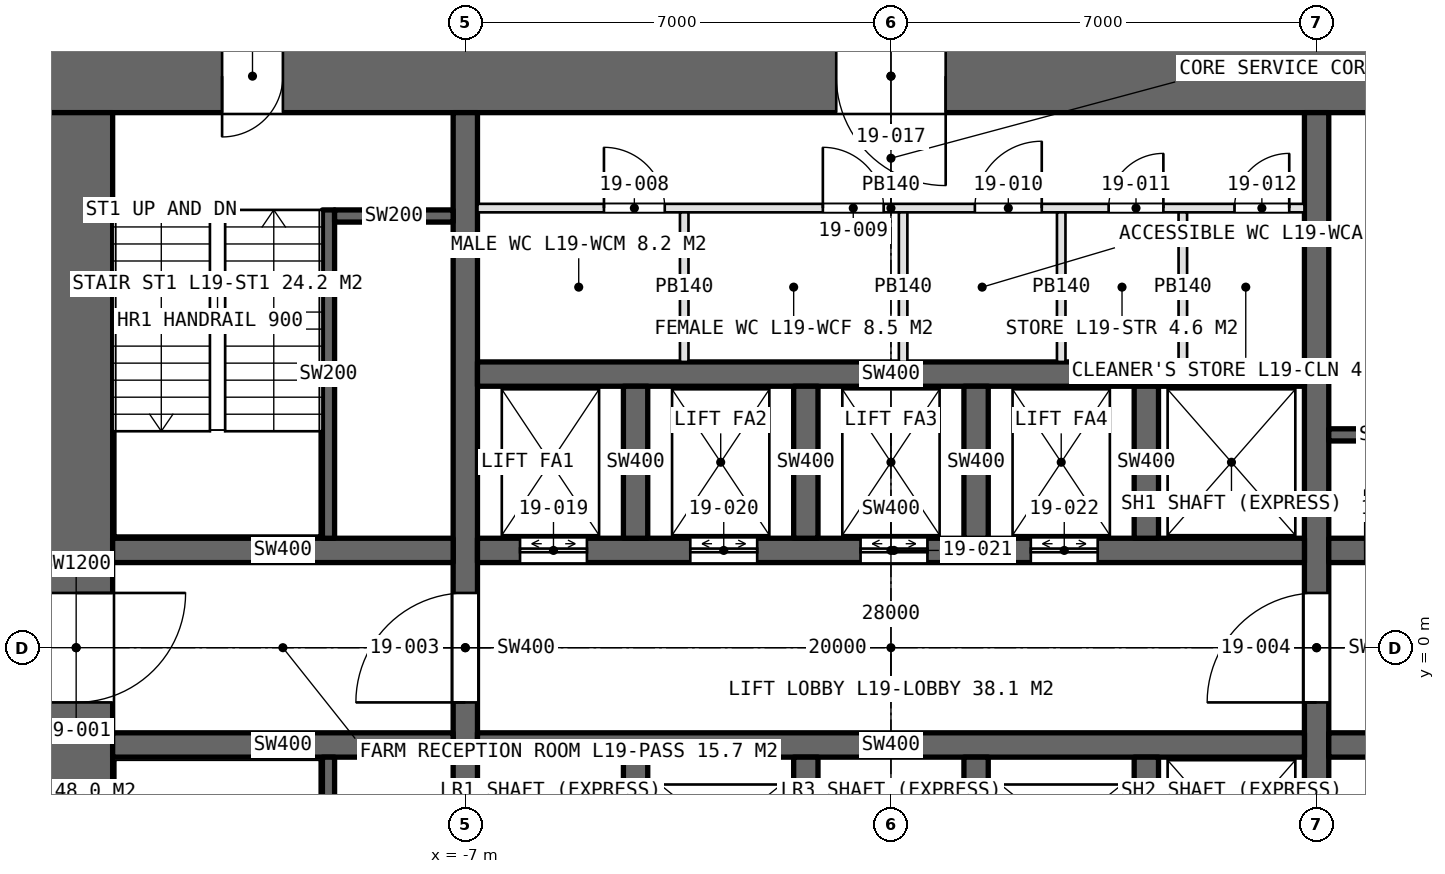
"""IFC4 building model, lengths in metres.
Left out: names, types, materials, properties, quantities, classifications, styles, units other than length and angle.
Written with IfcOpenShell. Run it as: python <this file> out.ifc"""

import sys

from ifc_helpers import new_model, si_unit, direction, frame, frame_2d, origin, place, context, subcontext, project, spatial, rectangle, extrude, element, fill, save


model = new_model("IFC4")
c1 = context("Model", 3, precision=1e-05, world=origin(), true_north=direction((0.0, 1.0)))
c2 = subcontext(c1, "Body", "Model", "MODEL_VIEW")
j1 = project(units=[si_unit("LENGTHUNIT", "METRE"), si_unit("PLANEANGLEUNIT", "RADIAN")], contexts=[c1])
p1 = place(None, origin())
s1 = spatial("IfcSite", under=j1, at=p1, CompositionType="ELEMENT")
p2 = place(p1, origin())
s2 = spatial("IfcBuilding", under=s1, at=p2, CompositionType="ELEMENT")
p3 = place(p2, frame((0.0, 0.0, 95.0)))
s3 = spatial("IfcBuildingStorey", under=s2, at=p3, CompositionType="ELEMENT", Elevation=95.0)
p4 = place(p3, frame((14.0, 9.4, 0.0), z_axis=(0.0, 0.0, 1.0), x_axis=(-1.0, 0.0, 0.0)))
e1 = element("IfcWall", 1, at=p4, inside=s3, PredefinedType="SHEAR", context=c2, shape_type="SweptSolid", body=[
    extrude(rectangle(XDim=28.0, YDim=1.2, at=frame_2d((14.0, 0.0))), origin(), (0.0, 0.0, 1.0), 5.0),
])
p5 = place(p4, frame((24.0, 0.0, 0.0)))
e2 = element("IfcOpeningElement", 2, at=p5, cuts=e1, PredefinedType="OPENING", context=c2, shape_type="SweptSolid", body=[
    extrude(rectangle(XDim=1.0, YDim=2.4, at=frame_2d((0.5, 1.2))), frame((0.0, 0.61, 0.0), z_axis=(0.0, -1.0, 0.0), x_axis=(1.0, 0.0, 0.0)), (0.0, 0.0, 1.0), 1.22),
])
p6 = place(p4, frame((13.1, 0.0, 0.0)))
e3 = element("IfcOpeningElement", 3, at=p6, cuts=e1, PredefinedType="OPENING", context=c2, shape_type="SweptSolid", body=[
    extrude(rectangle(XDim=1.8, YDim=2.4, at=frame_2d((0.9, 1.2))), frame((0.0, 0.61, 0.0), z_axis=(0.0, -1.0, 0.0), x_axis=(1.0, 0.0, 0.0)), (0.0, 0.0, 1.0), 1.22),
])
p7 = place(p3, frame((-13.4, 8.8, 0.0), z_axis=(0.0, 0.0, 1.0), x_axis=(0.0, -1.0, 0.0)))
e4 = element("IfcWall", 4, at=p7, inside=s3, PredefinedType="SHEAR", context=c2, shape_type="SweptSolid", body=[
    extrude(rectangle(XDim=17.6, YDim=1.2, at=frame_2d((8.8, 0.0))), origin(), (0.0, 0.0, 1.0), 5.0),
])
p8 = place(p7, frame((7.9, 0.0, 0.0)))
e5 = element("IfcOpeningElement", 5, at=p8, cuts=e4, PredefinedType="OPENING", context=c2, shape_type="SweptSolid", body=[
    extrude(rectangle(XDim=1.8, YDim=2.4, at=frame_2d((0.9, 1.2))), frame((0.0, 0.61, 0.0), z_axis=(0.0, -1.0, 0.0), x_axis=(1.0, 0.0, 0.0)), (0.0, 0.0, 1.0), 1.22),
])
p9 = place(p7, frame((16.5, 0.0, 0.0)))
e6 = element("IfcOpeningElement", 6, at=p9, cuts=e4, PredefinedType="OPENING", context=c2, shape_type="SweptSolid", body=[
    extrude(rectangle(XDim=1.0, YDim=2.4, at=frame_2d((0.5, 1.2))), frame((0.0, 0.61, 0.0), z_axis=(0.0, -1.0, 0.0), x_axis=(1.0, 0.0, 0.0)), (0.0, 0.0, 1.0), 1.22),
])
p10 = place(p3, frame((-7.0, -8.8, 0.0), z_axis=(0.0, 0.0, 1.0), x_axis=(0.0, 1.0, 0.0)))
e7 = element("IfcWall", 7, at=p10, inside=s3, PredefinedType="SHEAR", context=c2, shape_type="SweptSolid", body=[
    extrude(rectangle(XDim=17.6, YDim=0.4, at=frame_2d((8.8, 0.0))), origin(), (0.0, 0.0, 1.0), 5.0),
])
p11 = place(p10, frame((7.9, 0.0, 0.0)))
e8 = element("IfcOpeningElement", 8, at=p11, cuts=e7, PredefinedType="OPENING", context=c2, shape_type="SweptSolid", body=[
    extrude(rectangle(XDim=1.8, YDim=2.4, at=frame_2d((0.9, 1.2))), frame((0.0, 0.21, 0.0), z_axis=(0.0, -1.0, 0.0), x_axis=(1.0, 0.0, 0.0)), (0.0, 0.0, 1.0), 0.42),
])
p12 = place(p3, frame((7.0, -8.8, 0.0), z_axis=(0.0, 0.0, 1.0), x_axis=(0.0, 1.0, 0.0)))
e9 = element("IfcWall", 9, at=p12, inside=s3, PredefinedType="SHEAR", context=c2, shape_type="SweptSolid", body=[
    extrude(rectangle(XDim=17.6, YDim=0.4, at=frame_2d((8.8, 0.0))), origin(), (0.0, 0.0, 1.0), 5.0),
])
p13 = place(p12, frame((7.9, 0.0, 0.0)))
e10 = element("IfcOpeningElement", 10, at=p13, cuts=e9, PredefinedType="OPENING", context=c2, shape_type="SweptSolid", body=[
    extrude(rectangle(XDim=1.8, YDim=2.4, at=frame_2d((0.9, 1.2))), frame((0.0, 0.21, 0.0), z_axis=(0.0, -1.0, 0.0), x_axis=(1.0, 0.0, 0.0)), (0.0, 0.0, 1.0), 0.42),
])
p14 = place(p3, frame((-6.8, 1.6, 0.0), z_axis=(0.0, 0.0, 1.0), x_axis=(1.0, 0.0, 0.0)))
e11 = element("IfcWall", 11, at=p14, inside=s3, PredefinedType="SHEAR", context=c2, shape_type="SweptSolid", body=[
    extrude(rectangle(XDim=13.6, YDim=0.4, at=frame_2d((6.8, 0.0))), origin(), (0.0, 0.0, 1.0), 5.0),
])
p15 = place(p14, frame((0.7, 0.0, 0.0)))
e12 = element("IfcOpeningElement", 12, at=p15, cuts=e11, PredefinedType="OPENING", context=c2, shape_type="SweptSolid", body=[
    extrude(rectangle(XDim=1.1, YDim=2.4, at=frame_2d((0.55, 1.2))), frame((0.0, 0.21, 0.0), z_axis=(0.0, -1.0, 0.0), x_axis=(1.0, 0.0, 0.0)), (0.0, 0.0, 1.0), 0.42),
])
p16 = place(p14, frame((3.5, 0.0, 0.0)))
e13 = element("IfcOpeningElement", 13, at=p16, cuts=e11, PredefinedType="OPENING", context=c2, shape_type="SweptSolid", body=[
    extrude(rectangle(XDim=1.1, YDim=2.4, at=frame_2d((0.55, 1.2))), frame((0.0, 0.21, 0.0), z_axis=(0.0, -1.0, 0.0), x_axis=(1.0, 0.0, 0.0)), (0.0, 0.0, 1.0), 0.42),
])
p17 = place(p14, frame((6.3, 0.0, 0.0)))
e14 = element("IfcOpeningElement", 14, at=p17, cuts=e11, PredefinedType="OPENING", context=c2, shape_type="SweptSolid", body=[
    extrude(rectangle(XDim=1.1, YDim=2.4, at=frame_2d((0.55, 1.2))), frame((0.0, 0.21, 0.0), z_axis=(0.0, -1.0, 0.0), x_axis=(1.0, 0.0, 0.0)), (0.0, 0.0, 1.0), 0.42),
])
p18 = place(p14, frame((9.1, 0.0, 0.0)))
e15 = element("IfcOpeningElement", 15, at=p18, cuts=e11, PredefinedType="OPENING", context=c2, shape_type="SweptSolid", body=[
    extrude(rectangle(XDim=1.1, YDim=2.4, at=frame_2d((0.55, 1.2))), frame((0.0, 0.21, 0.0), z_axis=(0.0, -1.0, 0.0), x_axis=(1.0, 0.0, 0.0)), (0.0, 0.0, 1.0), 0.42),
])
for number, where, z_axis, x_axis in (
    (16, (-6.8, -1.6, 0.0), (0.0, 0.0, 1.0), (1.0, 0.0, 0.0)),
    (17, (-6.8, 4.5, 0.0), (0.0, 0.0, 1.0), (1.0, 0.0, 0.0)),
):
    element("IfcWall", number, at=place(p3, frame(where, z_axis=z_axis, x_axis=x_axis)), inside=s3, PredefinedType="SHEAR", context=c2, shape_type="SweptSolid", body=[
        extrude(rectangle(XDim=13.6, YDim=0.4, at=frame_2d((6.8, 0.0))), origin(), (0.0, 0.0, 1.0), 5.0),
    ])
for number, where, z_axis, x_axis in (
    (18, (-12.8, 1.6, 0.0), (0.0, 0.0, 1.0), (1.0, 0.0, 0.0)),
    (19, (-12.8, -1.6, 0.0), (0.0, 0.0, 1.0), (1.0, 0.0, 0.0)),
):
    element("IfcWall", number, at=place(p3, frame(where, z_axis=z_axis, x_axis=x_axis)), inside=s3, PredefinedType="SHEAR", context=c2, shape_type="SweptSolid", body=[
        extrude(rectangle(XDim=5.6, YDim=0.4, at=frame_2d((2.8, 0.0))), origin(), (0.0, 0.0, 1.0), 5.0),
    ])
p19 = place(p3, frame((7.2, 1.6, 0.0), z_axis=(0.0, 0.0, 1.0), x_axis=(1.0, 0.0, 0.0)))
e20 = element("IfcWall", 20, at=p19, inside=s3, PredefinedType="SHEAR", context=c2, shape_type="SweptSolid", body=[
    extrude(rectangle(XDim=5.6, YDim=0.4, at=frame_2d((2.8, 0.0))), origin(), (0.0, 0.0, 1.0), 5.0),
])
p20 = place(p19, frame((0.6, 0.0, 0.0)))
e21 = element("IfcOpeningElement", 21, at=p20, cuts=e20, PredefinedType="OPENING", context=c2, shape_type="SweptSolid", body=[
    extrude(rectangle(XDim=1.0, YDim=2.4, at=frame_2d((0.5, 1.2))), frame((0.0, 0.21, 0.0), z_axis=(0.0, -1.0, 0.0), x_axis=(1.0, 0.0, 0.0)), (0.0, 0.0, 1.0), 0.42),
])
p21 = place(p3, frame((7.2, -1.6, 0.0), z_axis=(0.0, 0.0, 1.0), x_axis=(1.0, 0.0, 0.0)))
e22 = element("IfcWall", 22, at=p21, inside=s3, PredefinedType="SHEAR", context=c2, shape_type="SweptSolid", body=[
    extrude(rectangle(XDim=5.6, YDim=0.4, at=frame_2d((2.8, 0.0))), origin(), (0.0, 0.0, 1.0), 5.0),
])
p22 = place(p21, frame((0.9, 0.0, 0.0)))
e23 = element("IfcOpeningElement", 23, at=p22, cuts=e22, PredefinedType="OPENING", context=c2, shape_type="SweptSolid", body=[
    extrude(rectangle(XDim=1.3, YDim=2.4, at=frame_2d((0.65, 1.2))), frame((0.0, 0.21, 0.0), z_axis=(0.0, -1.0, 0.0), x_axis=(1.0, 0.0, 0.0)), (0.0, 0.0, 1.0), 0.42),
])
p23 = place(p21, frame((3.9, 0.0, 0.0)))
e24 = element("IfcOpeningElement", 24, at=p23, cuts=e22, PredefinedType="OPENING", context=c2, shape_type="SweptSolid", body=[
    extrude(rectangle(XDim=1.3, YDim=2.4, at=frame_2d((0.65, 1.2))), frame((0.0, 0.21, 0.0), z_axis=(0.0, -1.0, 0.0), x_axis=(1.0, 0.0, 0.0)), (0.0, 0.0, 1.0), 0.42),
])
for number, where, z_axis, x_axis in (
    (25, (-4.2, 1.8, 0.0), (0.0, 0.0, 1.0), (0.0, 1.0, 0.0)),
    (26, (-4.2, -4.3, 0.0), (0.0, 0.0, 1.0), (0.0, 1.0, 0.0)),
    (27, (-1.4, 1.8, 0.0), (0.0, 0.0, 1.0), (0.0, 1.0, 0.0)),
    (28, (-1.4, -4.3, 0.0), (0.0, 0.0, 1.0), (0.0, 1.0, 0.0)),
    (29, (1.4, 1.8, 0.0), (0.0, 0.0, 1.0), (0.0, 1.0, 0.0)),
    (30, (1.4, -4.3, 0.0), (0.0, 0.0, 1.0), (0.0, 1.0, 0.0)),
    (31, (4.2, 1.8, 0.0), (0.0, 0.0, 1.0), (0.0, 1.0, 0.0)),
    (32, (4.2, -4.3, 0.0), (0.0, 0.0, 1.0), (0.0, 1.0, 0.0)),
):
    element("IfcWall", number, at=place(p3, frame(where, z_axis=z_axis, x_axis=x_axis)), inside=s3, PredefinedType="SHEAR", context=c2, shape_type="SweptSolid", body=[
        extrude(rectangle(XDim=2.5, YDim=0.4, at=frame_2d((1.25, 0.0))), origin(), (0.0, 0.0, 1.0), 5.0),
    ])
p24 = place(p3, frame((-6.8, 7.23, 0.0), z_axis=(0.0, 0.0, 1.0), x_axis=(1.0, 0.0, 0.0)))
e33 = element("IfcWall", 33, at=p24, inside=s3, PredefinedType="PARTITIONING", context=c2, shape_type="SweptSolid", body=[
    extrude(rectangle(XDim=13.6, YDim=0.14, at=frame_2d((6.8, 0.0))), origin(), (0.0, 0.0, 1.0), 4.75),
])
p25 = place(p24, frame((2.08, 0.0, 0.0)))
e34 = element("IfcOpeningElement", 34, at=p25, cuts=e33, PredefinedType="OPENING", context=c2, shape_type="SweptSolid", body=[
    extrude(rectangle(XDim=1.0, YDim=2.4, at=frame_2d((0.5, 1.2))), frame((0.0, 0.08, 0.0), z_axis=(0.0, -1.0, 0.0), x_axis=(1.0, 0.0, 0.0)), (0.0, 0.0, 1.0), 0.16),
])
p26 = place(p24, frame((5.68, 0.0, 0.0)))
e35 = element("IfcOpeningElement", 35, at=p26, cuts=e33, PredefinedType="OPENING", context=c2, shape_type="SweptSolid", body=[
    extrude(rectangle(XDim=1.0, YDim=2.4, at=frame_2d((0.5, 1.2))), frame((0.0, 0.08, 0.0), z_axis=(0.0, -1.0, 0.0), x_axis=(1.0, 0.0, 0.0)), (0.0, 0.0, 1.0), 0.16),
])
p27 = place(p24, frame((8.18, 0.0, 0.0)))
e36 = element("IfcOpeningElement", 36, at=p27, cuts=e33, PredefinedType="OPENING", context=c2, shape_type="SweptSolid", body=[
    extrude(rectangle(XDim=1.1, YDim=2.4, at=frame_2d((0.55, 1.2))), frame((0.0, 0.08, 0.0), z_axis=(0.0, -1.0, 0.0), x_axis=(1.0, 0.0, 0.0)), (0.0, 0.0, 1.0), 0.16),
])
p28 = place(p24, frame((10.38, 0.0, 0.0)))
e37 = element("IfcOpeningElement", 37, at=p28, cuts=e33, PredefinedType="OPENING", context=c2, shape_type="SweptSolid", body=[
    extrude(rectangle(XDim=0.9, YDim=2.4, at=frame_2d((0.45, 1.2))), frame((0.0, 0.08, 0.0), z_axis=(0.0, -1.0, 0.0), x_axis=(1.0, 0.0, 0.0)), (0.0, 0.0, 1.0), 0.16),
])
p29 = place(p24, frame((12.45, 0.0, 0.0)))
e38 = element("IfcOpeningElement", 38, at=p29, cuts=e33, PredefinedType="OPENING", context=c2, shape_type="SweptSolid", body=[
    extrude(rectangle(XDim=0.9, YDim=2.4, at=frame_2d((0.45, 1.2))), frame((0.0, 0.08, 0.0), z_axis=(0.0, -1.0, 0.0), x_axis=(1.0, 0.0, 0.0)), (0.0, 0.0, 1.0), 0.16),
])
for number, where, z_axis, x_axis in (
    (39, (-3.4, 4.7, 0.0), (0.0, 0.0, 1.0), (0.0, 1.0, 0.0)),
    (40, (0.2, 4.7, 0.0), (0.0, 0.0, 1.0), (0.0, 1.0, 0.0)),
    (41, (2.8, 4.7, 0.0), (0.0, 0.0, 1.0), (0.0, 1.0, 0.0)),
    (42, (4.8, 4.7, 0.0), (0.0, 0.0, 1.0), (0.0, 1.0, 0.0)),
):
    element("IfcWall", number, at=place(p3, frame(where, z_axis=z_axis, x_axis=x_axis)), inside=s3, PredefinedType="PARTITIONING", context=c2, shape_type="SweptSolid", body=[
        extrude(rectangle(XDim=2.46, YDim=0.14, at=frame_2d((1.23, 0.0))), origin(), (0.0, 0.0, 1.0), 4.75),
    ])
p30 = place(p3, frame((-9.25, 7.2, 0.0), z_axis=(0.0, 0.0, 1.0), x_axis=(0.0, -1.0, 0.0)))
e43 = element("IfcWall", 43, at=p30, inside=s3, PredefinedType="SOLIDWALL", context=c2, shape_type="SweptSolid", body=[
    extrude(rectangle(XDim=5.4, YDim=0.2, at=frame_2d((2.7, 0.0))), origin(), (0.0, 0.0, 1.0), 5.0),
])
p31 = place(p3, frame((-9.15, 7.1, 0.0), z_axis=(0.0, 0.0, 1.0), x_axis=(1.0, 0.0, 0.0)))
e44 = element("IfcWall", 44, at=p31, inside=s3, PredefinedType="SOLIDWALL", context=c2, shape_type="SweptSolid", body=[
    extrude(rectangle(XDim=1.95, YDim=0.2, at=frame_2d((0.975, 0.0))), origin(), (0.0, 0.0, 1.0), 5.0),
])
p32 = place(p3, frame((-9.25, -7.2, 0.0), z_axis=(0.0, 0.0, 1.0), x_axis=(0.0, 1.0, 0.0)))
e45 = element("IfcWall", 45, at=p32, inside=s3, PredefinedType="SOLIDWALL", context=c2, shape_type="SweptSolid", body=[
    extrude(rectangle(XDim=5.4, YDim=0.2, at=frame_2d((2.7, 0.0))), origin(), (0.0, 0.0, 1.0), 5.0),
])
p33 = place(p3, frame((9.15, 3.5, 0.0), z_axis=(0.0, 0.0, 1.0), x_axis=(-1.0, 0.0, 0.0)))
e46 = element("IfcWall", 46, at=p33, inside=s3, PredefinedType="SOLIDWALL", context=c2, shape_type="SweptSolid", body=[
    extrude(rectangle(XDim=1.95, YDim=0.2, at=frame_2d((0.975, 0.0))), origin(), (0.0, 0.0, 1.0), 5.0),
])
p34 = place(p8, origin())
e47 = element("IfcDoor", 47, at=p34, inside=s3, OperationType="DOUBLE_DOOR_SINGLE_SWING", PredefinedType="DOOR", context=c2, shape_type="SweptSolid", body=[
    extrude(rectangle(XDim=1.8, YDim=2.4, at=frame_2d((0.9, 1.2))), frame((0.0, 0.025, 0.0), z_axis=(0.0, -1.0, 0.0), x_axis=(1.0, 0.0, 0.0)), (0.0, 0.0, 1.0), 0.05),
])
fill(e5, e47)
p35 = place(p11, origin())
e48 = element("IfcDoor", 48, at=p35, inside=s3, OperationType="DOUBLE_DOOR_SINGLE_SWING", PredefinedType="DOOR", context=c2, shape_type="SweptSolid", body=[
    extrude(rectangle(XDim=1.8, YDim=2.4, at=frame_2d((0.9, 1.2))), frame((0.0, 0.025, 0.0), z_axis=(0.0, -1.0, 0.0), x_axis=(1.0, 0.0, 0.0)), (0.0, 0.0, 1.0), 0.05),
])
fill(e8, e48)
p36 = place(p13, origin())
e49 = element("IfcDoor", 49, at=p36, inside=s3, OperationType="DOUBLE_DOOR_SINGLE_SWING", PredefinedType="DOOR", context=c2, shape_type="SweptSolid", body=[
    extrude(rectangle(XDim=1.8, YDim=2.4, at=frame_2d((0.9, 1.2))), frame((0.0, 0.025, 0.0), z_axis=(0.0, -1.0, 0.0), x_axis=(1.0, 0.0, 0.0)), (0.0, 0.0, 1.0), 0.05),
])
fill(e10, e49)
p37 = place(p5, origin())
e50 = element("IfcDoor", 50, at=p37, inside=s3, OperationType="SINGLE_SWING_RIGHT", PredefinedType="DOOR", context=c2, shape_type="SweptSolid", body=[
    extrude(rectangle(XDim=1.0, YDim=2.4, at=frame_2d((0.5, 1.2))), frame((0.0, 0.025, 0.0), z_axis=(0.0, -1.0, 0.0), x_axis=(1.0, 0.0, 0.0)), (0.0, 0.0, 1.0), 0.05),
])
fill(e2, e50)
p38 = place(p25, origin())
e51 = element("IfcDoor", 51, at=p38, inside=s3, OperationType="SINGLE_SWING_LEFT", PredefinedType="DOOR", context=c2, shape_type="SweptSolid", body=[
    extrude(rectangle(XDim=1.0, YDim=2.4, at=frame_2d((0.5, 1.2))), frame((0.0, 0.025, 0.0), z_axis=(0.0, -1.0, 0.0), x_axis=(1.0, 0.0, 0.0)), (0.0, 0.0, 1.0), 0.05),
])
fill(e34, e51)
p39 = place(p26, origin())
e52 = element("IfcDoor", 52, at=p39, inside=s3, OperationType="SINGLE_SWING_LEFT", PredefinedType="DOOR", context=c2, shape_type="SweptSolid", body=[
    extrude(rectangle(XDim=1.0, YDim=2.4, at=frame_2d((0.5, 1.2))), frame((0.0, 0.025, 0.0), z_axis=(0.0, -1.0, 0.0), x_axis=(1.0, 0.0, 0.0)), (0.0, 0.0, 1.0), 0.05),
])
fill(e35, e52)
p40 = place(p27, origin())
e53 = element("IfcDoor", 53, at=p40, inside=s3, OperationType="SINGLE_SWING_RIGHT", PredefinedType="DOOR", context=c2, shape_type="SweptSolid", body=[
    extrude(rectangle(XDim=1.1, YDim=2.4, at=frame_2d((0.55, 1.2))), frame((0.0, 0.025, 0.0), z_axis=(0.0, -1.0, 0.0), x_axis=(1.0, 0.0, 0.0)), (0.0, 0.0, 1.0), 0.05),
])
fill(e36, e53)
p41 = place(p28, origin())
e54 = element("IfcDoor", 54, at=p41, inside=s3, OperationType="SINGLE_SWING_RIGHT", PredefinedType="DOOR", context=c2, shape_type="SweptSolid", body=[
    extrude(rectangle(XDim=0.9, YDim=2.4, at=frame_2d((0.45, 1.2))), frame((0.0, 0.025, 0.0), z_axis=(0.0, -1.0, 0.0), x_axis=(1.0, 0.0, 0.0)), (0.0, 0.0, 1.0), 0.05),
])
fill(e37, e54)
p42 = place(p29, origin())
e55 = element("IfcDoor", 55, at=p42, inside=s3, OperationType="SINGLE_SWING_RIGHT", PredefinedType="DOOR", context=c2, shape_type="SweptSolid", body=[
    extrude(rectangle(XDim=0.9, YDim=2.4, at=frame_2d((0.45, 1.2))), frame((0.0, 0.025, 0.0), z_axis=(0.0, -1.0, 0.0), x_axis=(1.0, 0.0, 0.0)), (0.0, 0.0, 1.0), 0.05),
])
fill(e38, e55)
p43 = place(p6, origin())
e56 = element("IfcDoor", 56, at=p43, inside=s3, OperationType="DOUBLE_DOOR_SINGLE_SWING", PredefinedType="DOOR", context=c2, shape_type="SweptSolid", body=[
    extrude(rectangle(XDim=1.8, YDim=2.4, at=frame_2d((0.9, 1.2))), frame((0.0, 0.025, 0.0), z_axis=(0.0, -1.0, 0.0), x_axis=(1.0, 0.0, 0.0)), (0.0, 0.0, 1.0), 0.05),
])
fill(e3, e56)
p44 = place(p15, origin())
e57 = element("IfcDoor", 57, at=p44, inside=s3, OperationType="DOUBLE_DOOR_SLIDING", PredefinedType="DOOR", context=c2, shape_type="SweptSolid", body=[
    extrude(rectangle(XDim=1.1, YDim=2.4, at=frame_2d((0.55, 1.2))), frame((0.0, 0.025, 0.0), z_axis=(0.0, -1.0, 0.0), x_axis=(1.0, 0.0, 0.0)), (0.0, 0.0, 1.0), 0.05),
])
fill(e12, e57)
p45 = place(p16, origin())
e58 = element("IfcDoor", 58, at=p45, inside=s3, OperationType="DOUBLE_DOOR_SLIDING", PredefinedType="DOOR", context=c2, shape_type="SweptSolid", body=[
    extrude(rectangle(XDim=1.1, YDim=2.4, at=frame_2d((0.55, 1.2))), frame((0.0, 0.025, 0.0), z_axis=(0.0, -1.0, 0.0), x_axis=(1.0, 0.0, 0.0)), (0.0, 0.0, 1.0), 0.05),
])
fill(e13, e58)
p46 = place(p17, origin())
e59 = element("IfcDoor", 59, at=p46, inside=s3, OperationType="DOUBLE_DOOR_SLIDING", PredefinedType="DOOR", context=c2, shape_type="SweptSolid", body=[
    extrude(rectangle(XDim=1.1, YDim=2.4, at=frame_2d((0.55, 1.2))), frame((0.0, 0.025, 0.0), z_axis=(0.0, -1.0, 0.0), x_axis=(1.0, 0.0, 0.0)), (0.0, 0.0, 1.0), 0.05),
])
fill(e14, e59)
p47 = place(p18, origin())
e60 = element("IfcDoor", 60, at=p47, inside=s3, OperationType="DOUBLE_DOOR_SLIDING", PredefinedType="DOOR", context=c2, shape_type="SweptSolid", body=[
    extrude(rectangle(XDim=1.1, YDim=2.4, at=frame_2d((0.55, 1.2))), frame((0.0, 0.025, 0.0), z_axis=(0.0, -1.0, 0.0), x_axis=(1.0, 0.0, 0.0)), (0.0, 0.0, 1.0), 0.05),
])
fill(e15, e60)
save(model, sys.argv[1])
